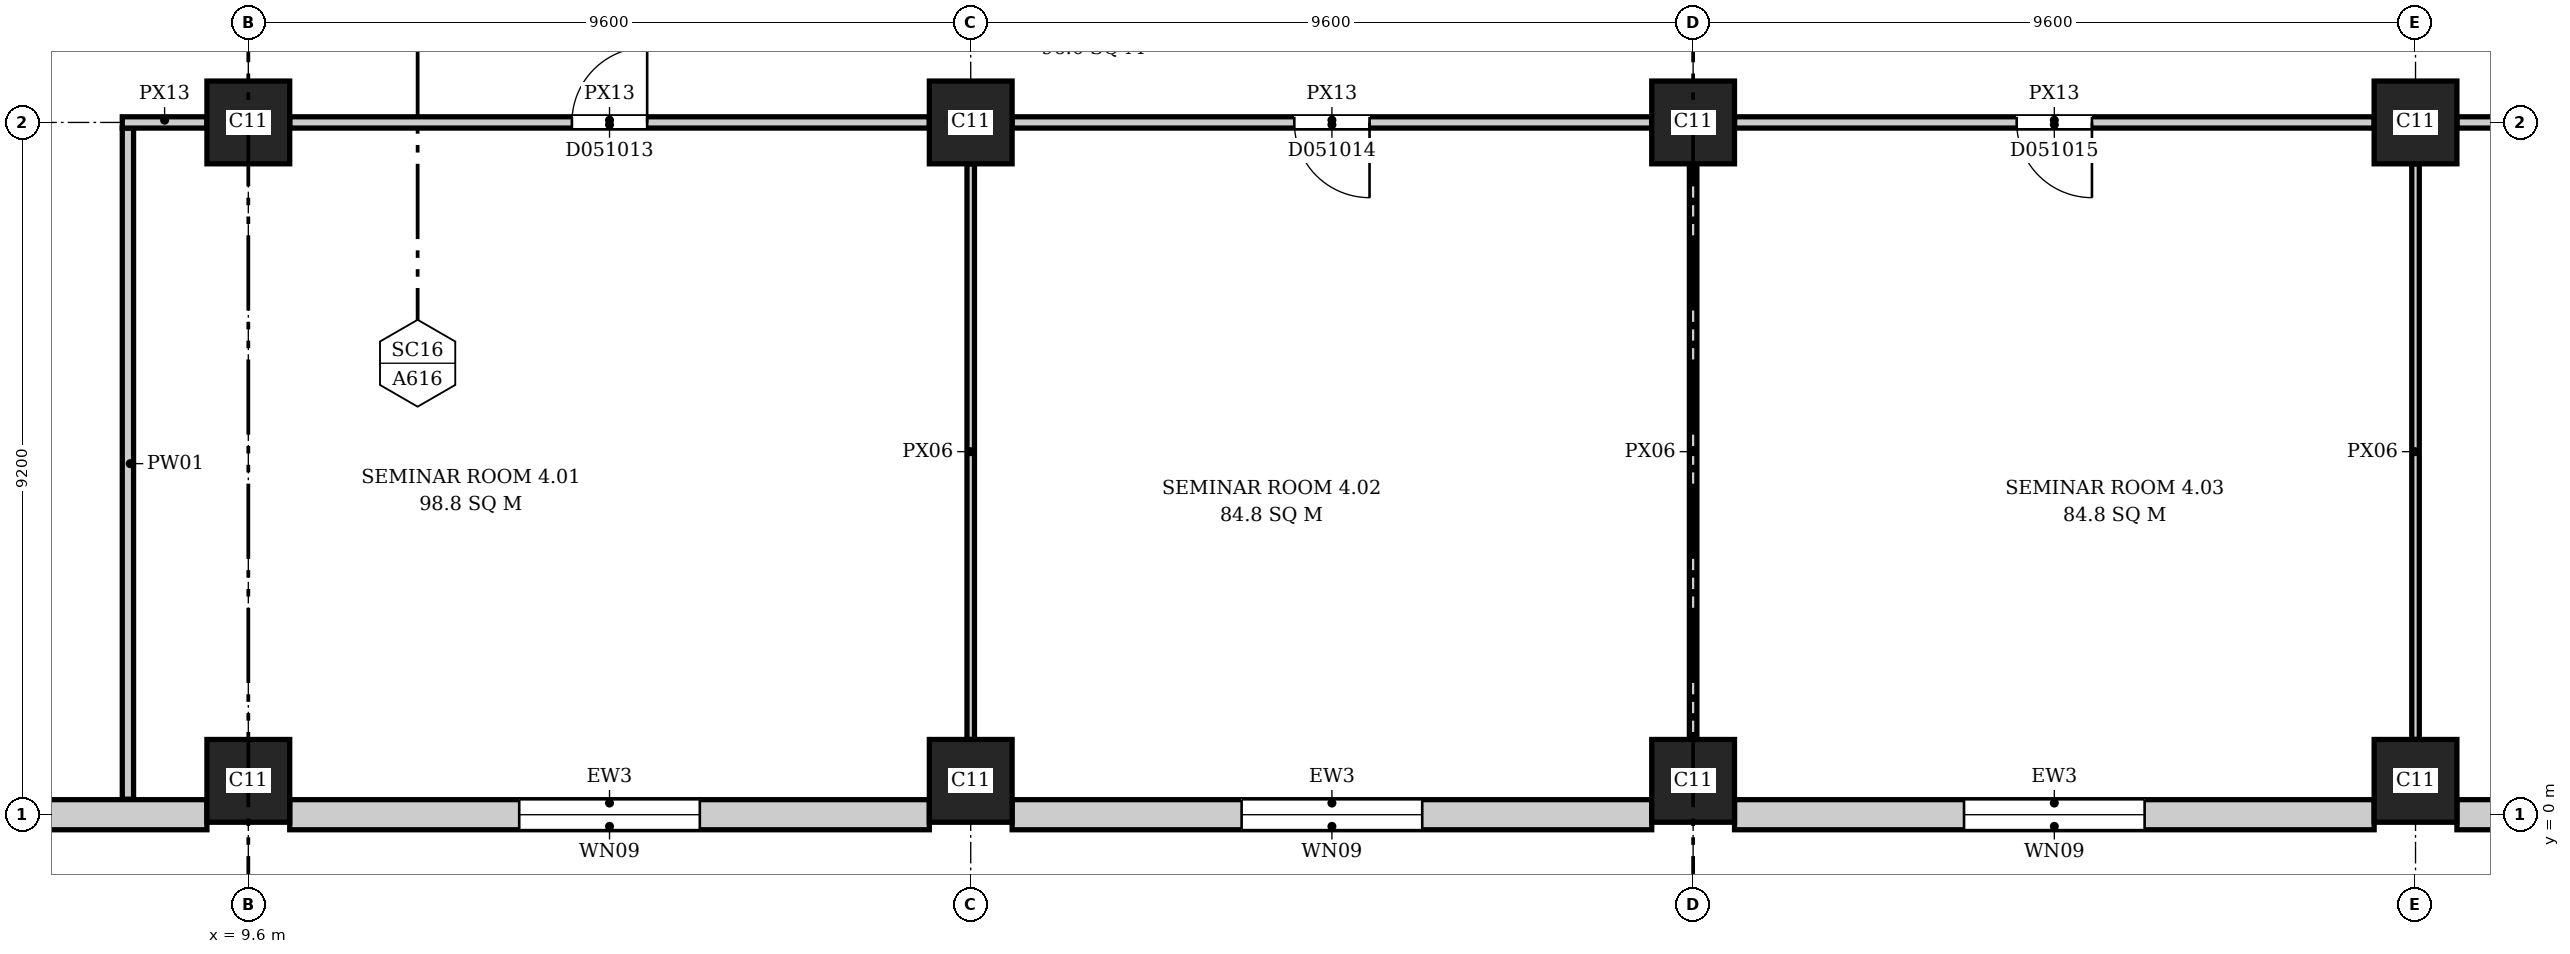
"""IFC4 building model, lengths in metres.
Left out: names, types, materials, properties, quantities, classifications, styles, units other than length and angle.
Written with IfcOpenShell. Run it as: python <this file> out.ifc"""

import sys

from ifc_helpers import new_model, si_unit, direction, frame, frame_2d, origin, origin_2d, place, context, subcontext, project, spatial, rectangle, extrude, element, fill, save


model = new_model("IFC4")
c1 = context("Model", 3, precision=1e-05, world=origin(), true_north=direction((0.0, 1.0)))
c2 = subcontext(c1, "Body", "Model", "MODEL_VIEW")
j1 = project(units=[si_unit("LENGTHUNIT", "METRE"), si_unit("PLANEANGLEUNIT", "RADIAN")], contexts=[c1])
p1 = place(None, origin())
s1 = spatial("IfcSite", under=j1, at=p1, CompositionType="ELEMENT")
p2 = place(p1, origin())
s2 = spatial("IfcBuilding", under=s1, at=p2, CompositionType="ELEMENT")
p3 = place(p2, frame((0.0, 0.0, 26.7)))
s3 = spatial("IfcBuildingStorey", under=s2, at=p3, CompositionType="ELEMENT", Elevation=26.7)
for number, where, z_axis, x_axis in (
    (1, (9.6, 0.45, 0.0), (0.0, 0.0, 1.0), (1.0, 0.0, 0.0)),
    (2, (19.2, 0.45, 0.0), (0.0, 0.0, 1.0), (1.0, 0.0, 0.0)),
    (3, (28.8, 0.45, 0.0), (0.0, 0.0, 1.0), (1.0, 0.0, 0.0)),
    (4, (38.4, 0.45, 0.0), (0.0, 0.0, 1.0), (1.0, 0.0, 0.0)),
    (5, (9.6, 9.2, 0.0), (0.0, 0.0, 1.0), (1.0, 0.0, 0.0)),
    (6, (19.2, 9.2, 0.0), (0.0, 0.0, 1.0), (1.0, 0.0, 0.0)),
    (7, (28.8, 9.2, 0.0), (0.0, 0.0, 1.0), (1.0, 0.0, 0.0)),
    (8, (38.4, 9.2, 0.0), (0.0, 0.0, 1.0), (1.0, 0.0, 0.0)),
):
    element("IfcColumn", number, at=place(p3, frame(where, z_axis=z_axis, x_axis=x_axis)), inside=s3, PredefinedType="COLUMN", context=c2, shape_type="SweptSolid", body=[
        extrude(rectangle(XDim=1.1, YDim=1.1, at=origin_2d()), origin(), (0.0, 0.0, 1.0), 5.2),
    ])
p4 = place(p3, frame((0.2, 0.0, 0.0), z_axis=(0.0, 0.0, 1.0), x_axis=(1.0, 0.0, 0.0)))
e9 = element("IfcWall", 9, at=p4, inside=s3, PredefinedType="ELEMENTEDWALL", context=c2, shape_type="SweptSolid", body=[
    extrude(rectangle(XDim=8.85, YDim=0.4, at=frame_2d((4.425, 0.0))), origin(), (0.0, 0.0, 1.0), 4.85),
])
p5 = place(p4, frame((3.4, 0.0, 1.0)))
e10 = element("IfcOpeningElement", 10, at=p5, cuts=e9, PredefinedType="OPENING", context=c2, shape_type="SweptSolid", body=[
    extrude(rectangle(XDim=2.4, YDim=2.2, at=frame_2d((1.2, 1.1))), frame((0.0, 0.21, 0.0), z_axis=(0.0, -1.0, 0.0), x_axis=(1.0, 0.0, 0.0)), (0.0, 0.0, 1.0), 0.42),
])
p6 = place(p3, frame((10.15, 0.0, 0.0), z_axis=(0.0, 0.0, 1.0), x_axis=(1.0, 0.0, 0.0)))
e11 = element("IfcWall", 11, at=p6, inside=s3, PredefinedType="ELEMENTEDWALL", context=c2, shape_type="SweptSolid", body=[
    extrude(rectangle(XDim=8.5, YDim=0.4, at=frame_2d((4.25, 0.0))), origin(), (0.0, 0.0, 1.0), 4.85),
])
p7 = place(p6, frame((3.05, 0.0, 1.0)))
e12 = element("IfcOpeningElement", 12, at=p7, cuts=e11, PredefinedType="OPENING", context=c2, shape_type="SweptSolid", body=[
    extrude(rectangle(XDim=2.4, YDim=2.2, at=frame_2d((1.2, 1.1))), frame((0.0, 0.21, 0.0), z_axis=(0.0, -1.0, 0.0), x_axis=(1.0, 0.0, 0.0)), (0.0, 0.0, 1.0), 0.42),
])
p8 = place(p3, frame((19.75, 0.0, 0.0), z_axis=(0.0, 0.0, 1.0), x_axis=(1.0, 0.0, 0.0)))
e13 = element("IfcWall", 13, at=p8, inside=s3, PredefinedType="ELEMENTEDWALL", context=c2, shape_type="SweptSolid", body=[
    extrude(rectangle(XDim=8.5, YDim=0.4, at=frame_2d((4.25, 0.0))), origin(), (0.0, 0.0, 1.0), 4.85),
])
p9 = place(p8, frame((3.05, 0.0, 1.0)))
e14 = element("IfcOpeningElement", 14, at=p9, cuts=e13, PredefinedType="OPENING", context=c2, shape_type="SweptSolid", body=[
    extrude(rectangle(XDim=2.4, YDim=2.2, at=frame_2d((1.2, 1.1))), frame((0.0, 0.21, 0.0), z_axis=(0.0, -1.0, 0.0), x_axis=(1.0, 0.0, 0.0)), (0.0, 0.0, 1.0), 0.42),
])
p10 = place(p3, frame((29.35, 0.0, 0.0), z_axis=(0.0, 0.0, 1.0), x_axis=(1.0, 0.0, 0.0)))
e15 = element("IfcWall", 15, at=p10, inside=s3, PredefinedType="ELEMENTEDWALL", context=c2, shape_type="SweptSolid", body=[
    extrude(rectangle(XDim=8.5, YDim=0.4, at=frame_2d((4.25, 0.0))), origin(), (0.0, 0.0, 1.0), 4.85),
])
p11 = place(p10, frame((3.05, 0.0, 1.0)))
e16 = element("IfcOpeningElement", 16, at=p11, cuts=e15, PredefinedType="OPENING", context=c2, shape_type="SweptSolid", body=[
    extrude(rectangle(XDim=2.4, YDim=2.2, at=frame_2d((1.2, 1.1))), frame((0.0, 0.21, 0.0), z_axis=(0.0, -1.0, 0.0), x_axis=(1.0, 0.0, 0.0)), (0.0, 0.0, 1.0), 0.42),
])
p12 = place(p3, frame((38.95, 0.0, 0.0), z_axis=(0.0, 0.0, 1.0), x_axis=(1.0, 0.0, 0.0)))
e17 = element("IfcWall", 17, at=p12, inside=s3, PredefinedType="ELEMENTEDWALL", context=c2, shape_type="SweptSolid", body=[
    extrude(rectangle(XDim=8.5, YDim=0.4, at=frame_2d((4.25, 0.0))), origin(), (0.0, 0.0, 1.0), 4.85),
])
p13 = place(p12, frame((3.05, 0.0, 1.0)))
e18 = element("IfcOpeningElement", 18, at=p13, cuts=e17, PredefinedType="OPENING", context=c2, shape_type="SweptSolid", body=[
    extrude(rectangle(XDim=2.4, YDim=2.2, at=frame_2d((1.2, 1.1))), frame((0.0, 0.21, 0.0), z_axis=(0.0, -1.0, 0.0), x_axis=(1.0, 0.0, 0.0)), (0.0, 0.0, 1.0), 0.42),
])
p14 = place(p3, frame((8.0, 0.206, 0.0), z_axis=(0.0, 0.0, 1.0), x_axis=(0.0, 1.0, 0.0)))
e19 = element("IfcWall", 19, at=p14, inside=s3, PredefinedType="PARTITIONING", context=c2, shape_type="SweptSolid", body=[
    extrude(rectangle(XDim=8.919, YDim=0.15, at=frame_2d((4.459, 0.0))), origin(), (0.0, 0.0, 1.0), 4.85),
])
p15 = place(p3, frame((7.925, 9.2, 0.0), z_axis=(0.0, 0.0, 1.0), x_axis=(1.0, 0.0, 0.0)))
e20 = element("IfcWall", 20, at=p15, inside=s3, PredefinedType="PARTITIONING", context=c2, shape_type="SweptSolid", body=[
    extrude(rectangle(XDim=1.125, YDim=0.15, at=frame_2d((0.562, 0.0))), origin(), (0.0, 0.0, 1.0), 4.45),
])
p16 = place(p3, frame((10.15, 9.2, 0.0), z_axis=(0.0, 0.0, 1.0), x_axis=(1.0, 0.0, 0.0)))
e21 = element("IfcWall", 21, at=p16, inside=s3, PredefinedType="PARTITIONING", context=c2, shape_type="SweptSolid", body=[
    extrude(rectangle(XDim=8.5, YDim=0.15, at=frame_2d((4.25, 0.0))), origin(), (0.0, 0.0, 1.0), 4.45),
])
p17 = place(p16, frame((3.75, 0.0, 0.0)))
e22 = element("IfcOpeningElement", 22, at=p17, cuts=e21, PredefinedType="OPENING", context=c2, shape_type="SweptSolid", body=[
    extrude(rectangle(XDim=1.0, YDim=2.1, at=frame_2d((0.5, 1.05))), frame((0.0, 0.085, 0.0), z_axis=(0.0, -1.0, 0.0), x_axis=(1.0, 0.0, 0.0)), (0.0, 0.0, 1.0), 0.17),
])
p18 = place(p3, frame((19.2, 1.0, 0.0), z_axis=(0.0, 0.0, 1.0), x_axis=(0.0, 1.0, 0.0)))
e23 = element("IfcWall", 23, at=p18, inside=s3, PredefinedType="PARTITIONING", context=c2, shape_type="SweptSolid", body=[
    extrude(rectangle(XDim=7.65, YDim=0.1, at=frame_2d((3.825, 0.0))), origin(), (0.0, 0.0, 1.0), 4.45),
])
p19 = place(p3, frame((19.75, 9.2, 0.0), z_axis=(0.0, 0.0, 1.0), x_axis=(1.0, 0.0, 0.0)))
e24 = element("IfcWall", 24, at=p19, inside=s3, PredefinedType="PARTITIONING", context=c2, shape_type="SweptSolid", body=[
    extrude(rectangle(XDim=8.5, YDim=0.15, at=frame_2d((4.25, 0.0))), origin(), (0.0, 0.0, 1.0), 4.45),
])
p20 = place(p19, frame((3.75, 0.0, 0.0)))
e25 = element("IfcOpeningElement", 25, at=p20, cuts=e24, PredefinedType="OPENING", context=c2, shape_type="SweptSolid", body=[
    extrude(rectangle(XDim=1.0, YDim=2.1, at=frame_2d((0.5, 1.05))), frame((0.0, 0.085, 0.0), z_axis=(0.0, -1.0, 0.0), x_axis=(1.0, 0.0, 0.0)), (0.0, 0.0, 1.0), 0.17),
])
p21 = place(p3, frame((28.8, 1.0, 0.0), z_axis=(0.0, 0.0, 1.0), x_axis=(0.0, 1.0, 0.0)))
e26 = element("IfcWall", 26, at=p21, inside=s3, PredefinedType="PARTITIONING", context=c2, shape_type="SweptSolid", body=[
    extrude(rectangle(XDim=7.65, YDim=0.1, at=frame_2d((3.825, 0.0))), origin(), (0.0, 0.0, 1.0), 4.45),
])
p22 = place(p3, frame((29.35, 9.2, 0.0), z_axis=(0.0, 0.0, 1.0), x_axis=(1.0, 0.0, 0.0)))
e27 = element("IfcWall", 27, at=p22, inside=s3, PredefinedType="PARTITIONING", context=c2, shape_type="SweptSolid", body=[
    extrude(rectangle(XDim=8.5, YDim=0.15, at=frame_2d((4.25, 0.0))), origin(), (0.0, 0.0, 1.0), 4.45),
])
p23 = place(p22, frame((3.75, 0.0, 0.0)))
e28 = element("IfcOpeningElement", 28, at=p23, cuts=e27, PredefinedType="OPENING", context=c2, shape_type="SweptSolid", body=[
    extrude(rectangle(XDim=1.0, YDim=2.1, at=frame_2d((0.5, 1.05))), frame((0.0, 0.085, 0.0), z_axis=(0.0, -1.0, 0.0), x_axis=(1.0, 0.0, 0.0)), (0.0, 0.0, 1.0), 0.17),
])
p24 = place(p3, frame((38.4, 1.0, 0.0), z_axis=(0.0, 0.0, 1.0), x_axis=(0.0, 1.0, 0.0)))
e29 = element("IfcWall", 29, at=p24, inside=s3, PredefinedType="PARTITIONING", context=c2, shape_type="SweptSolid", body=[
    extrude(rectangle(XDim=7.65, YDim=0.1, at=frame_2d((3.825, 0.0))), origin(), (0.0, 0.0, 1.0), 4.45),
])
p25 = place(p3, frame((38.95, 9.2, 0.0), z_axis=(0.0, 0.0, 1.0), x_axis=(1.0, 0.0, 0.0)))
e30 = element("IfcWall", 30, at=p25, inside=s3, PredefinedType="PARTITIONING", context=c2, shape_type="SweptSolid", body=[
    extrude(rectangle(XDim=8.5, YDim=0.15, at=frame_2d((4.25, 0.0))), origin(), (0.0, 0.0, 1.0), 4.45),
])
p26 = place(p25, frame((3.75, 0.0, 0.0)))
e31 = element("IfcOpeningElement", 31, at=p26, cuts=e30, PredefinedType="OPENING", context=c2, shape_type="SweptSolid", body=[
    extrude(rectangle(XDim=1.0, YDim=2.1, at=frame_2d((0.5, 1.05))), frame((0.0, 0.085, 0.0), z_axis=(0.0, -1.0, 0.0), x_axis=(1.0, 0.0, 0.0)), (0.0, 0.0, 1.0), 0.17),
])
p27 = place(p7, origin())
e32 = element("IfcWindow", 32, at=p27, inside=s3, PartitioningType="SINGLE_PANEL", PredefinedType="WINDOW", context=c2, shape_type="SweptSolid", body=[
    extrude(rectangle(XDim=2.4, YDim=2.2, at=frame_2d((1.2, 1.1))), frame((0.0, 0.03, 0.0), z_axis=(0.0, -1.0, 0.0), x_axis=(1.0, 0.0, 0.0)), (0.0, 0.0, 1.0), 0.06),
])
fill(e12, e32)
p28 = place(p9, origin())
e33 = element("IfcWindow", 33, at=p28, inside=s3, PartitioningType="SINGLE_PANEL", PredefinedType="WINDOW", context=c2, shape_type="SweptSolid", body=[
    extrude(rectangle(XDim=2.4, YDim=2.2, at=frame_2d((1.2, 1.1))), frame((0.0, 0.03, 0.0), z_axis=(0.0, -1.0, 0.0), x_axis=(1.0, 0.0, 0.0)), (0.0, 0.0, 1.0), 0.06),
])
fill(e14, e33)
p29 = place(p11, origin())
e34 = element("IfcWindow", 34, at=p29, inside=s3, PartitioningType="SINGLE_PANEL", PredefinedType="WINDOW", context=c2, shape_type="SweptSolid", body=[
    extrude(rectangle(XDim=2.4, YDim=2.2, at=frame_2d((1.2, 1.1))), frame((0.0, 0.03, 0.0), z_axis=(0.0, -1.0, 0.0), x_axis=(1.0, 0.0, 0.0)), (0.0, 0.0, 1.0), 0.06),
])
fill(e16, e34)
p30 = place(p17, origin())
e35 = element("IfcDoor", 35, at=p30, inside=s3, OperationType="SINGLE_SWING_RIGHT", PredefinedType="DOOR", context=c2, shape_type="SweptSolid", body=[
    extrude(rectangle(XDim=1.0, YDim=2.1, at=frame_2d((0.5, 1.05))), frame((0.0, 0.025, 0.0), z_axis=(0.0, -1.0, 0.0), x_axis=(1.0, 0.0, 0.0)), (0.0, 0.0, 1.0), 0.05),
])
fill(e22, e35)
p31 = place(p20, origin())
e36 = element("IfcDoor", 36, at=p31, inside=s3, OperationType="SINGLE_SWING_RIGHT", PredefinedType="DOOR", context=c2, shape_type="SweptSolid", body=[
    extrude(rectangle(XDim=1.0, YDim=2.1, at=frame_2d((0.5, 1.05))), frame((0.0, 0.025, 0.0), z_axis=(0.0, -1.0, 0.0), x_axis=(1.0, 0.0, 0.0)), (0.0, 0.0, 1.0), 0.05),
])
fill(e25, e36)
p32 = place(p23, origin())
e37 = element("IfcDoor", 37, at=p32, inside=s3, OperationType="SINGLE_SWING_RIGHT", PredefinedType="DOOR", context=c2, shape_type="SweptSolid", body=[
    extrude(rectangle(XDim=1.0, YDim=2.1, at=frame_2d((0.5, 1.05))), frame((0.0, 0.025, 0.0), z_axis=(0.0, -1.0, 0.0), x_axis=(1.0, 0.0, 0.0)), (0.0, 0.0, 1.0), 0.05),
])
fill(e28, e37)
save(model, sys.argv[1])
